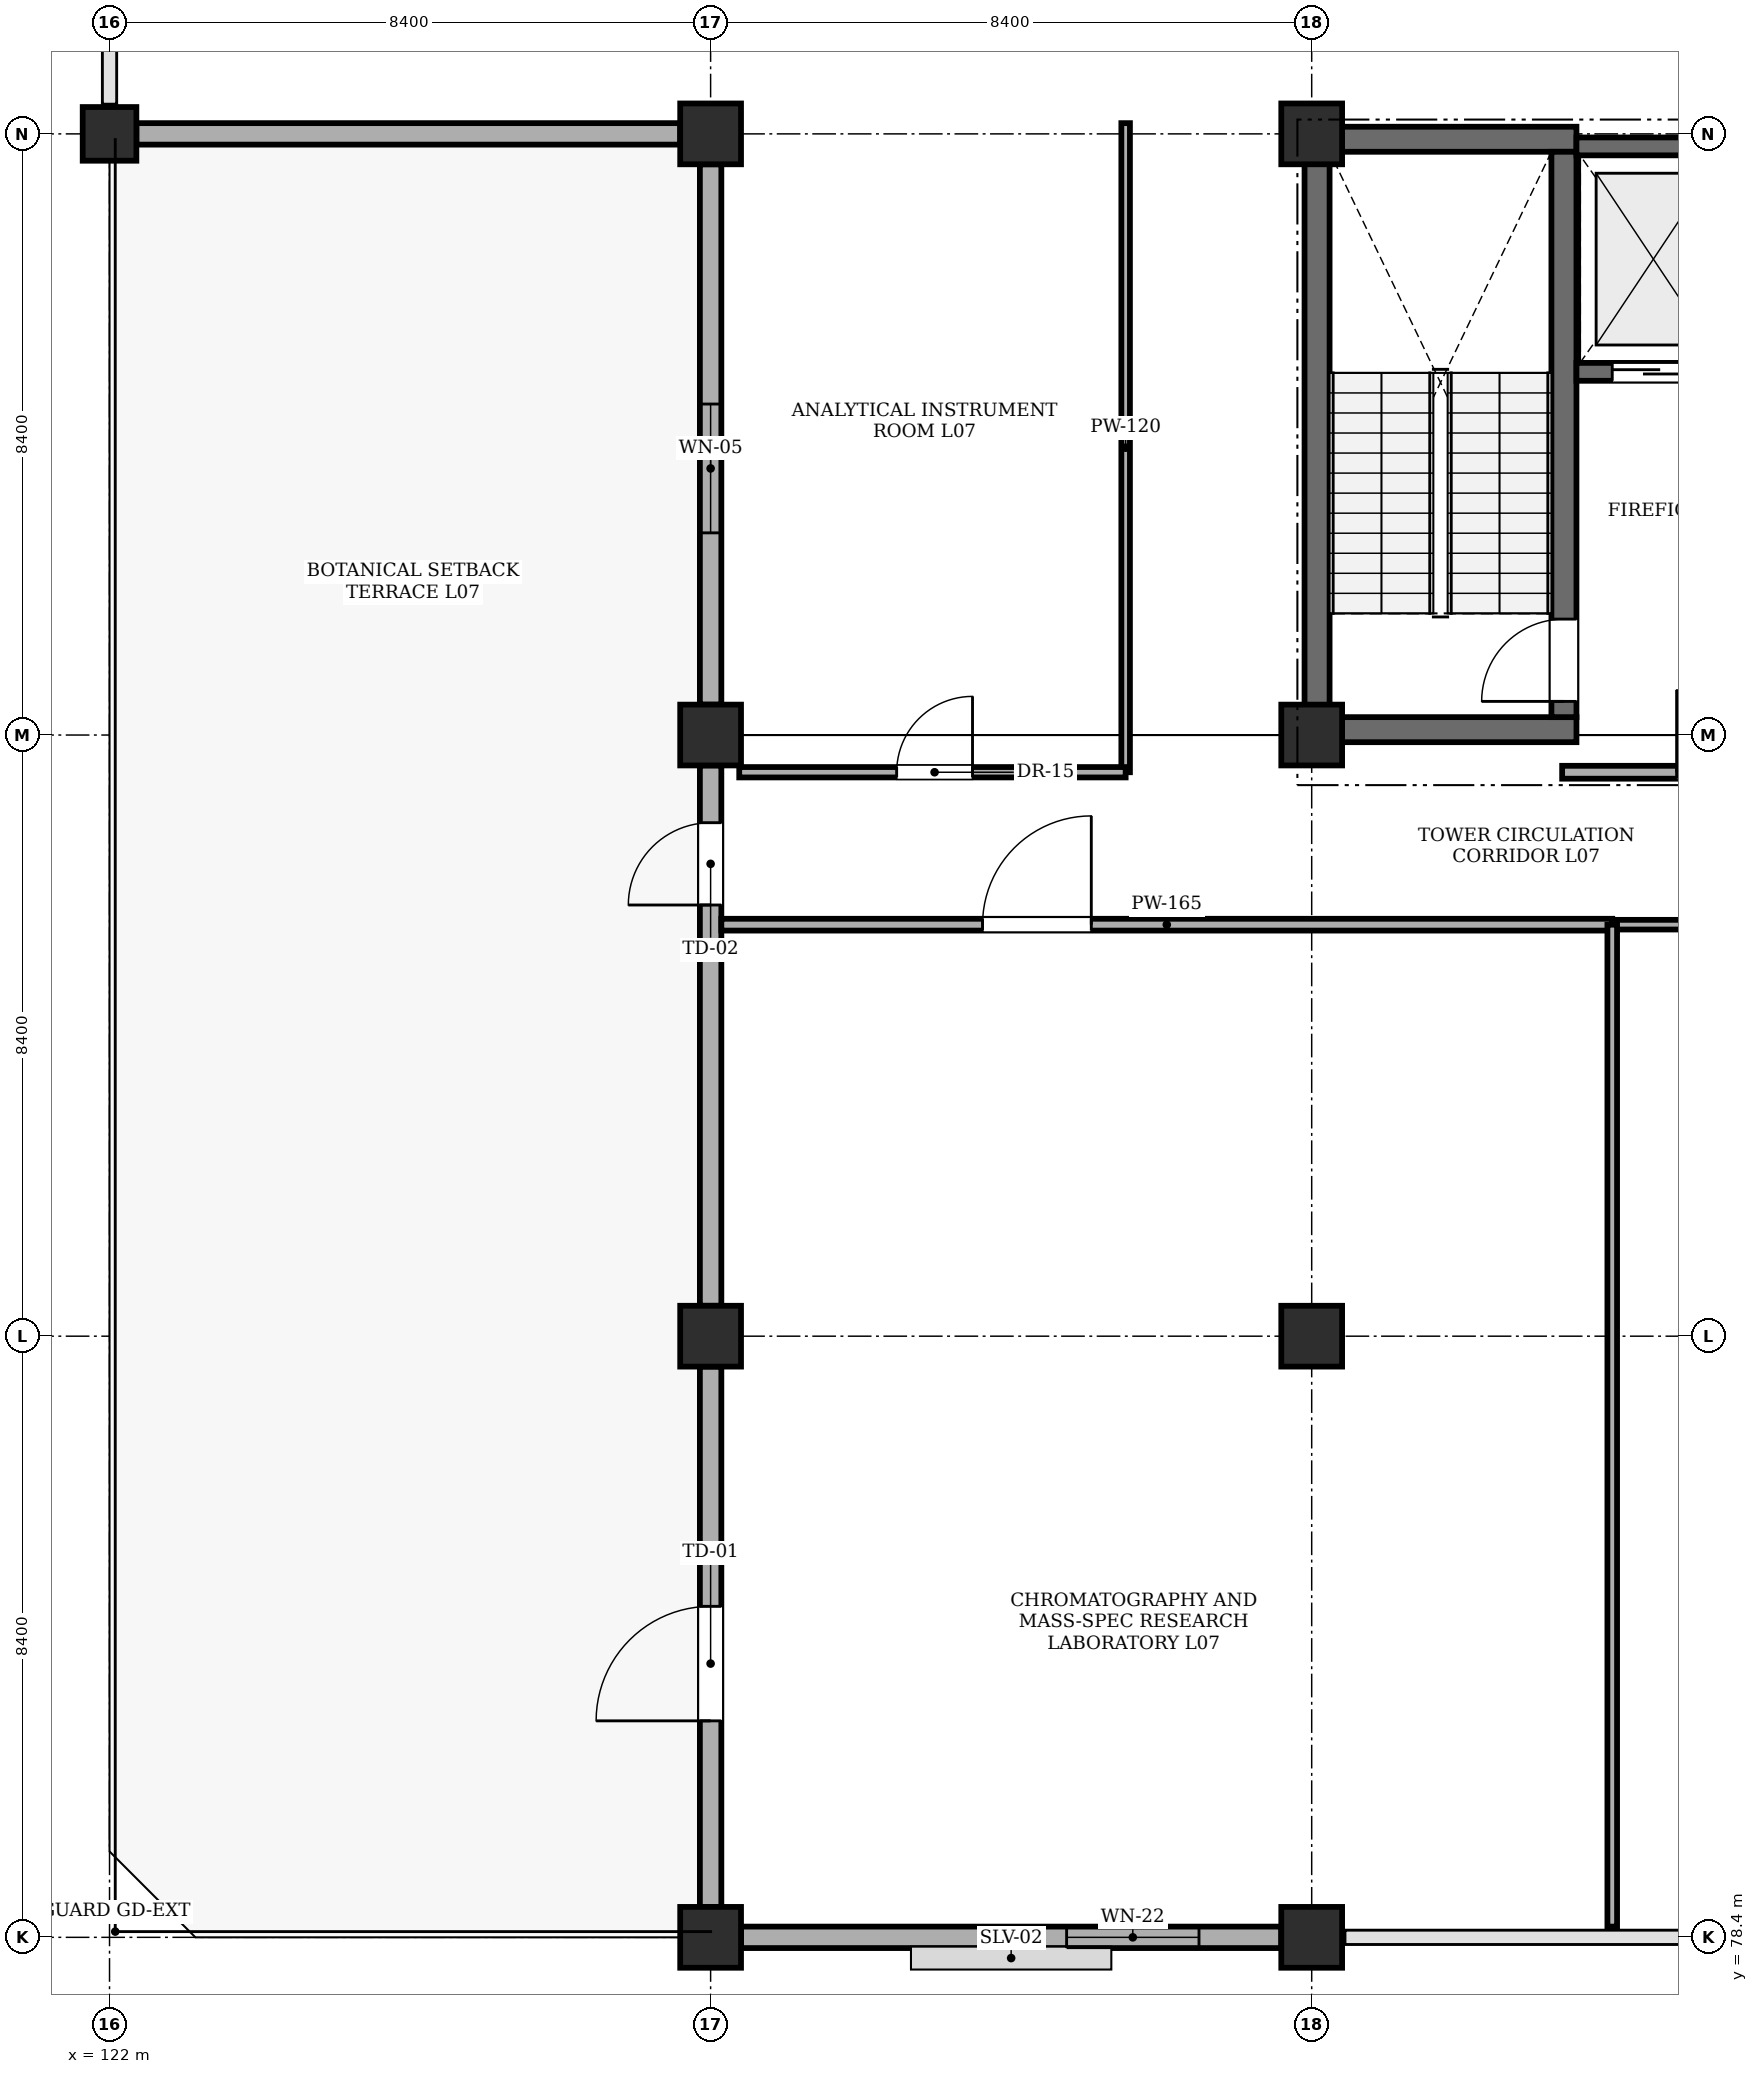
"""IFC4 building model, lengths in metres.
Left out: names, types, materials, properties, quantities, classifications, styles, units other than length and angle.
Written with IfcOpenShell. Run it as: python <this file> out.ifc"""

import sys

from ifc_helpers import new_model, si_unit, direction, frame, frame_2d, origin, origin_2d, place, context, subcontext, project, spatial, rectangle, extrude, element, fill, save


model = new_model("IFC4")
c1 = context("Model", 3, precision=1e-05, world=origin(), true_north=direction((0.0, 1.0)))
c2 = subcontext(c1, "Body", "Model", "MODEL_VIEW")
j1 = project(units=[si_unit("LENGTHUNIT", "METRE"), si_unit("PLANEANGLEUNIT", "RADIAN")], contexts=[c1])
p1 = place(None, origin())
s1 = spatial("IfcSite", under=j1, at=p1, CompositionType="ELEMENT")
p2 = place(p1, origin())
s2 = spatial("IfcBuilding", under=s1, at=p2, CompositionType="ELEMENT")
p3 = place(p2, frame((0.0, 0.0, 27.6)))
s3 = spatial("IfcBuildingStorey", under=s2, at=p3, CompositionType="ELEMENT", Elevation=27.6)
p4 = place(p3, frame((122.0, 103.6, 0.0), z_axis=(0.0, 0.0, 1.0), x_axis=(1.0, 0.0, 0.0)))
e1 = element("IfcColumn", 1, at=p4, inside=s3, PredefinedType="COLUMN", context=c2, shape_type="SweptSolid", body=[
    extrude(rectangle(XDim=0.75, YDim=0.75, at=origin_2d()), origin(), (0.0, 0.0, 1.0), 4.02),
])
for number, where, z_axis, x_axis in (
    (2, (130.4, 78.4, 0.0), (0.0, 0.0, 1.0), (1.0, 0.0, 0.0)),
    (3, (130.4, 86.8, 0.0), (0.0, 0.0, 1.0), (1.0, 0.0, 0.0)),
    (4, (130.4, 95.2, 0.0), (0.0, 0.0, 1.0), (1.0, 0.0, 0.0)),
    (5, (130.4, 103.6, 0.0), (0.0, 0.0, 1.0), (1.0, 0.0, 0.0)),
    (6, (138.8, 78.4, 0.0), (0.0, 0.0, 1.0), (1.0, 0.0, 0.0)),
    (7, (138.8, 86.8, 0.0), (0.0, 0.0, 1.0), (1.0, 0.0, 0.0)),
    (8, (138.8, 95.2, 0.0), (0.0, 0.0, 1.0), (1.0, 0.0, 0.0)),
    (9, (138.8, 103.6, 0.0), (0.0, 0.0, 1.0), (1.0, 0.0, 0.0)),
):
    element("IfcColumn", number, at=place(p3, frame(where, z_axis=z_axis, x_axis=x_axis)), inside=s3, PredefinedType="COLUMN", context=c2, shape_type="SweptSolid", body=[
        extrude(rectangle(XDim=0.85, YDim=0.85, at=origin_2d()), origin(), (0.0, 0.0, 1.0), 4.02),
    ])
for number, where, z_axis, x_axis in (
    (10, (138.7, 95.275, 0.0), (0.0, 0.0, 1.0), (1.0, 0.0, 0.0)),
    (11, (138.7, 103.525, 0.0), (0.0, 0.0, 1.0), (1.0, 0.0, 0.0)),
):
    element("IfcWall", number, at=place(p3, frame(where, z_axis=z_axis, x_axis=x_axis)), inside=s3, PredefinedType="SHEAR", context=c2, shape_type="SweptSolid", body=[
        extrude(rectangle(XDim=3.8, YDim=0.35, at=frame_2d((1.9, 0.0))), origin(), (0.0, 0.0, 1.0), 4.02),
    ])
p5 = place(p3, frame((138.875, 95.45, 0.0), z_axis=(0.0, 0.0, 1.0), x_axis=(0.0, 1.0, 0.0)))
e12 = element("IfcWall", 12, at=p5, inside=s3, PredefinedType="SHEAR", context=c2, shape_type="SweptSolid", body=[
    extrude(rectangle(XDim=7.9, YDim=0.35, at=frame_2d((3.95, 0.0))), origin(), (0.0, 0.0, 1.0), 4.02),
])
p6 = place(p3, frame((142.325, 95.45, 0.0), z_axis=(0.0, 0.0, 1.0), x_axis=(0.0, 1.0, 0.0)))
e13 = element("IfcWall", 13, at=p6, inside=s3, PredefinedType="SHEAR", context=c2, shape_type="SweptSolid", body=[
    extrude(rectangle(XDim=7.9, YDim=0.35, at=frame_2d((3.95, 0.0))), origin(), (0.0, 0.0, 1.0), 4.02),
])
p7 = place(p6, frame((0.22, 0.0, 0.0)))
e14 = element("IfcOpeningElement", 14, at=p7, cuts=e13, PredefinedType="OPENING", context=c2, shape_type="SweptSolid", body=[
    extrude(rectangle(XDim=1.15, YDim=2.15, at=frame_2d((0.575, 1.075))), frame((0.0, 0.185, 0.0), z_axis=(0.0, -1.0, 0.0), x_axis=(1.0, 0.0, 0.0)), (0.0, 0.0, 1.0), 0.37),
])
p8 = place(p3, frame((142.5, 100.275, 0.0), z_axis=(0.0, 0.0, 1.0), x_axis=(1.0, 0.0, 0.0)))
e15 = element("IfcWall", 15, at=p8, inside=s3, PredefinedType="SHEAR", context=c2, shape_type="SweptSolid", body=[
    extrude(rectangle(XDim=2.1, YDim=0.25, at=frame_2d((1.05, 0.0))), origin(), (0.0, 0.0, 1.0), 4.02),
])
p9 = place(p8, frame((0.5, 0.0, 0.0)))
e16 = element("IfcOpeningElement", 16, at=p9, cuts=e15, PredefinedType="OPENING", context=c2, shape_type="SweptSolid", body=[
    extrude(rectangle(XDim=1.1, YDim=2.15, at=frame_2d((0.55, 1.075))), frame((0.0, 0.135, 0.0), z_axis=(0.0, -1.0, 0.0), x_axis=(1.0, 0.0, 0.0)), (0.0, 0.0, 1.0), 0.27),
])
p10 = place(p3, frame((142.5, 103.425, 0.0), z_axis=(0.0, 0.0, 1.0), x_axis=(1.0, 0.0, 0.0)))
e17 = element("IfcWall", 17, at=p10, inside=s3, PredefinedType="SHEAR", context=c2, shape_type="SweptSolid", body=[
    extrude(rectangle(XDim=2.1, YDim=0.25, at=frame_2d((1.05, 0.0))), origin(), (0.0, 0.0, 1.0), 4.02),
])
p11 = place(p3, frame((138.375, 78.4, 0.0), z_axis=(0.0, 0.0, 1.0), x_axis=(-1.0, 0.0, 0.0)))
e18 = element("IfcWall", 18, at=p11, inside=s3, PredefinedType="STANDARD", context=c2, shape_type="SweptSolid", body=[
    extrude(rectangle(XDim=7.55, YDim=0.3, at=frame_2d((3.775, 0.0))), origin(), (0.0, 0.0, 1.0), 3.32),
])
p12 = place(p11, frame((1.15, 0.0, 0.95)))
e19 = element("IfcOpeningElement", 19, at=p12, cuts=e18, PredefinedType="OPENING", context=c2, shape_type="SweptSolid", body=[
    extrude(rectangle(XDim=1.85, YDim=2.05, at=frame_2d((0.925, 1.025))), frame((0.0, 0.16, 0.0), z_axis=(0.0, -1.0, 0.0), x_axis=(1.0, 0.0, 0.0)), (0.0, 0.0, 1.0), 0.32),
])
p13 = place(p3, frame((130.4, 78.825, 0.0), z_axis=(0.0, 0.0, 1.0), x_axis=(0.0, 1.0, 0.0)))
e20 = element("IfcWall", 20, at=p13, inside=s3, PredefinedType="STANDARD", context=c2, shape_type="SweptSolid", body=[
    extrude(rectangle(XDim=7.55, YDim=0.3, at=frame_2d((3.775, 0.0))), origin(), (0.0, 0.0, 1.0), 3.32),
])
p14 = place(p13, frame((2.6, 0.0, 0.0)))
e21 = element("IfcOpeningElement", 21, at=p14, cuts=e20, PredefinedType="OPENING", context=c2, shape_type="SweptSolid", body=[
    extrude(rectangle(XDim=1.6, YDim=2.25, at=frame_2d((0.8, 1.125))), frame((0.0, 0.16, 0.0), z_axis=(0.0, -1.0, 0.0), x_axis=(1.0, 0.0, 0.0)), (0.0, 0.0, 1.0), 0.32),
])
p15 = place(p3, frame((130.4, 87.225, 0.0), z_axis=(0.0, 0.0, 1.0), x_axis=(0.0, 1.0, 0.0)))
e22 = element("IfcWall", 22, at=p15, inside=s3, PredefinedType="STANDARD", context=c2, shape_type="SweptSolid", body=[
    extrude(rectangle(XDim=7.55, YDim=0.3, at=frame_2d((3.775, 0.0))), origin(), (0.0, 0.0, 1.0), 3.32),
])
p16 = place(p15, frame((5.6, 0.0, 0.0)))
e23 = element("IfcOpeningElement", 23, at=p16, cuts=e22, PredefinedType="OPENING", context=c2, shape_type="SweptSolid", body=[
    extrude(rectangle(XDim=1.15, YDim=2.25, at=frame_2d((0.575, 1.125))), frame((0.0, 0.16, 0.0), z_axis=(0.0, -1.0, 0.0), x_axis=(1.0, 0.0, 0.0)), (0.0, 0.0, 1.0), 0.32),
])
p17 = place(p3, frame((130.4, 95.625, 0.0), z_axis=(0.0, 0.0, 1.0), x_axis=(0.0, 1.0, 0.0)))
e24 = element("IfcWall", 24, at=p17, inside=s3, PredefinedType="STANDARD", context=c2, shape_type="SweptSolid", body=[
    extrude(rectangle(XDim=7.55, YDim=0.3, at=frame_2d((3.775, 0.0))), origin(), (0.0, 0.0, 1.0), 3.32),
])
p18 = place(p17, frame((2.4, 0.0, 1.0)))
e25 = element("IfcOpeningElement", 25, at=p18, cuts=e24, PredefinedType="OPENING", context=c2, shape_type="SweptSolid", body=[
    extrude(rectangle(XDim=1.8, YDim=1.8, at=frame_2d((0.9, 0.9))), frame((0.0, 0.16, 0.0), z_axis=(0.0, -1.0, 0.0), x_axis=(1.0, 0.0, 0.0)), (0.0, 0.0, 1.0), 0.32),
])
p19 = place(p3, frame((129.975, 103.6, 0.0), z_axis=(0.0, 0.0, 1.0), x_axis=(-1.0, 0.0, 0.0)))
e26 = element("IfcWall", 26, at=p19, inside=s3, PredefinedType="STANDARD", context=c2, shape_type="SweptSolid", body=[
    extrude(rectangle(XDim=7.6, YDim=0.3, at=frame_2d((3.8, 0.0))), origin(), (0.0, 0.0, 1.0), 3.32),
])
p20 = place(p3, frame((142.3, 94.68, 0.0), z_axis=(0.0, 0.0, 1.0), x_axis=(1.0, 0.0, 0.0)))
e27 = element("IfcWall", 27, at=p20, inside=s3, PredefinedType="STANDARD", context=c2, shape_type="SweptSolid", body=[
    extrude(rectangle(XDim=4.8, YDim=0.18, at=frame_2d((2.4, 0.0))), origin(), (0.0, 0.0, 1.0), 4.02),
])
p21 = place(p20, frame((1.6, 0.0, 0.0)))
e28 = element("IfcOpeningElement", 28, at=p21, cuts=e27, PredefinedType="OPENING", context=c2, shape_type="SweptSolid", body=[
    extrude(rectangle(XDim=1.15, YDim=2.15, at=frame_2d((0.575, 1.075))), frame((0.0, 0.1, 0.0), z_axis=(0.0, -1.0, 0.0), x_axis=(1.0, 0.0, 0.0)), (0.0, 0.0, 1.0), 0.2),
])
p22 = place(p3, frame((136.2, 94.68, 0.0), z_axis=(0.0, 0.0, 1.0), x_axis=(0.0, 1.0, 0.0)))
e29 = element("IfcWall", 29, at=p22, inside=s3, PredefinedType="PARTITIONING", context=c2, shape_type="SweptSolid", body=[
    extrude(rectangle(XDim=9.07, YDim=0.12, at=frame_2d((4.535, 0.0))), origin(), (0.0, 0.0, 1.0), 4.02),
])
p23 = place(p3, frame((130.8, 94.68, 0.0), z_axis=(0.0, 0.0, 1.0), x_axis=(1.0, 0.0, 0.0)))
e30 = element("IfcWall", 30, at=p23, inside=s3, PredefinedType="PARTITIONING", context=c2, shape_type="SweptSolid", body=[
    extrude(rectangle(XDim=5.4, YDim=0.145, at=frame_2d((2.7, 0.0))), origin(), (0.0, 0.0, 1.0), 4.02),
])
p24 = place(p23, frame((2.2, 0.0, 0.0)))
e31 = element("IfcOpeningElement", 31, at=p24, cuts=e30, PredefinedType="OPENING", context=c2, shape_type="SweptSolid", body=[
    extrude(rectangle(XDim=1.06, YDim=2.16, at=frame_2d((0.53, 1.08))), frame((0.0, 0.083, 0.0), z_axis=(0.0, -1.0, 0.0), x_axis=(1.0, 0.0, 0.0)), (0.0, 0.0, 1.0), 0.165),
])
p25 = place(p3, frame((130.55, 92.55, 0.0), z_axis=(0.0, 0.0, 1.0), x_axis=(1.0, 0.0, 0.0)))
e32 = element("IfcWall", 32, at=p25, inside=s3, PredefinedType="PARTITIONING", context=c2, shape_type="SweptSolid", body=[
    extrude(rectangle(XDim=12.45, YDim=0.165, at=frame_2d((6.225, 0.0))), origin(), (0.0, 0.0, 1.0), 4.02),
])
p26 = place(p25, frame((3.65, 0.0, 0.0)))
e33 = element("IfcOpeningElement", 33, at=p26, cuts=e32, PredefinedType="OPENING", context=c2, shape_type="SweptSolid", body=[
    extrude(rectangle(XDim=1.52, YDim=2.22, at=frame_2d((0.76, 1.11))), frame((0.0, 0.093, 0.0), z_axis=(0.0, -1.0, 0.0), x_axis=(1.0, 0.0, 0.0)), (0.0, 0.0, 1.0), 0.185),
])
p27 = place(p3, frame((143.0, 92.55, 0.0), z_axis=(0.0, 0.0, 1.0), x_axis=(1.0, 0.0, 0.0)))
e34 = element("IfcWall", 34, at=p27, inside=s3, PredefinedType="PARTITIONING", context=c2, shape_type="SweptSolid", body=[
    extrude(rectangle(XDim=12.6, YDim=0.135, at=frame_2d((6.3, 0.0))), origin(), (0.0, 0.0, 1.0), 4.02),
])
p28 = place(p27, frame((6.8, 0.0, 0.0)))
e35 = element("IfcOpeningElement", 35, at=p28, cuts=e34, PredefinedType="OPENING", context=c2, shape_type="SweptSolid", body=[
    extrude(rectangle(XDim=1.08, YDim=2.15, at=frame_2d((0.54, 1.075))), frame((0.0, 0.077, 0.0), z_axis=(0.0, -1.0, 0.0), x_axis=(1.0, 0.0, 0.0)), (0.0, 0.0, 1.0), 0.155),
])
p29 = place(p3, frame((143.0, 78.55, 0.0), z_axis=(0.0, 0.0, 1.0), x_axis=(0.0, 1.0, 0.0)))
e36 = element("IfcWall", 36, at=p29, inside=s3, PredefinedType="PARTITIONING", context=c2, shape_type="SweptSolid", body=[
    extrude(rectangle(XDim=14.0, YDim=0.135, at=frame_2d((7.0, 0.0))), origin(), (0.0, 0.0, 1.0), 3.52),
])
p30 = place(p12, origin())
e37 = element("IfcWindow", 37, at=p30, inside=s3, PartitioningType="DOUBLE_PANEL_VERTICAL", PredefinedType="WINDOW", context=c2, shape_type="SweptSolid", body=[
    extrude(rectangle(XDim=1.85, YDim=2.05, at=frame_2d((0.925, 1.025))), frame((0.0, 0.03, 0.0), z_axis=(0.0, -1.0, 0.0), x_axis=(1.0, 0.0, 0.0)), (0.0, 0.0, 1.0), 0.06),
])
fill(e19, e37)
p31 = place(p14, origin())
e38 = element("IfcDoor", 38, at=p31, inside=s3, OperationType="SINGLE_SWING_LEFT", PredefinedType="DOOR", context=c2, shape_type="SweptSolid", body=[
    extrude(rectangle(XDim=1.6, YDim=2.25, at=frame_2d((0.8, 1.125))), frame((0.0, 0.025, 0.0), z_axis=(0.0, -1.0, 0.0), x_axis=(1.0, 0.0, 0.0)), (0.0, 0.0, 1.0), 0.05),
])
fill(e21, e38)
p32 = place(p16, origin())
e39 = element("IfcDoor", 39, at=p32, inside=s3, OperationType="SINGLE_SWING_LEFT", PredefinedType="DOOR", context=c2, shape_type="SweptSolid", body=[
    extrude(rectangle(XDim=1.15, YDim=2.25, at=frame_2d((0.575, 1.125))), frame((0.0, 0.025, 0.0), z_axis=(0.0, -1.0, 0.0), x_axis=(1.0, 0.0, 0.0)), (0.0, 0.0, 1.0), 0.05),
])
fill(e23, e39)
p33 = place(p18, origin())
e40 = element("IfcWindow", 40, at=p33, inside=s3, PartitioningType="DOUBLE_PANEL_VERTICAL", PredefinedType="WINDOW", context=c2, shape_type="SweptSolid", body=[
    extrude(rectangle(XDim=1.8, YDim=1.8, at=frame_2d((0.9, 0.9))), frame((0.0, 0.03, 0.0), z_axis=(0.0, -1.0, 0.0), x_axis=(1.0, 0.0, 0.0)), (0.0, 0.0, 1.0), 0.06),
])
fill(e25, e40)
p34 = place(p21, origin())
e41 = element("IfcDoor", 41, at=p34, inside=s3, OperationType="SINGLE_SWING_LEFT", PredefinedType="DOOR", context=c2, shape_type="SweptSolid", body=[
    extrude(rectangle(XDim=1.15, YDim=2.15, at=frame_2d((0.575, 1.075))), frame((0.0, 0.025, 0.0), z_axis=(0.0, -1.0, 0.0), x_axis=(1.0, 0.0, 0.0)), (0.0, 0.0, 1.0), 0.05),
])
fill(e28, e41)
p35 = place(p24, origin())
e42 = element("IfcDoor", 42, at=p35, inside=s3, OperationType="SINGLE_SWING_RIGHT", PredefinedType="DOOR", context=c2, shape_type="SweptSolid", body=[
    extrude(rectangle(XDim=1.06, YDim=2.16, at=frame_2d((0.53, 1.08))), frame((0.0, 0.025, 0.0), z_axis=(0.0, -1.0, 0.0), x_axis=(1.0, 0.0, 0.0)), (0.0, 0.0, 1.0), 0.05),
])
fill(e31, e42)
p36 = place(p26, origin())
e43 = element("IfcDoor", 43, at=p36, inside=s3, OperationType="SINGLE_SWING_RIGHT", PredefinedType="DOOR", context=c2, shape_type="SweptSolid", body=[
    extrude(rectangle(XDim=1.52, YDim=2.22, at=frame_2d((0.76, 1.11))), frame((0.0, 0.025, 0.0), z_axis=(0.0, -1.0, 0.0), x_axis=(1.0, 0.0, 0.0)), (0.0, 0.0, 1.0), 0.05),
])
fill(e33, e43)
p37 = place(p7, origin())
e44 = element("IfcDoor", 44, at=p37, inside=s3, OperationType="SINGLE_SWING_LEFT", PredefinedType="DOOR", context=c2, shape_type="SweptSolid", body=[
    extrude(rectangle(XDim=1.15, YDim=2.15, at=frame_2d((0.575, 1.075))), frame((0.0, 0.025, 0.0), z_axis=(0.0, -1.0, 0.0), x_axis=(1.0, 0.0, 0.0)), (0.0, 0.0, 1.0), 0.05),
])
fill(e14, e44)
p38 = place(p9, origin())
e45 = element("IfcDoor", 45, at=p38, inside=s3, OperationType="SLIDING_TO_LEFT", PredefinedType="DOOR", context=c2, shape_type="SweptSolid", body=[
    extrude(rectangle(XDim=1.1, YDim=2.15, at=frame_2d((0.55, 1.075))), frame((0.0, 0.025, 0.0), z_axis=(0.0, -1.0, 0.0), x_axis=(1.0, 0.0, 0.0)), (0.0, 0.0, 1.0), 0.05),
])
fill(e16, e45)
save(model, sys.argv[1])
